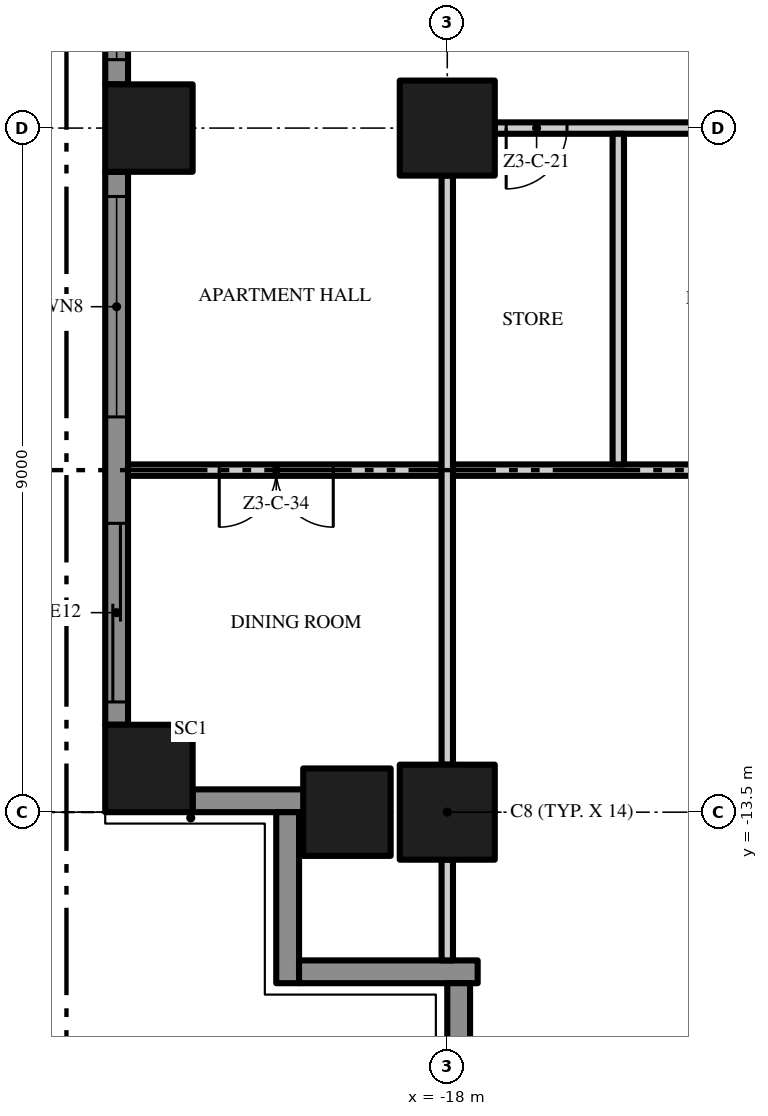
"""IFC4 building model, lengths in metres.
Left out: names, types, materials, properties, quantities, classifications, styles, units other than length and angle.
Written with IfcOpenShell. Run it as: python <this file> out.ifc"""

import sys

from ifc_helpers import new_model, si_unit, direction, frame, frame_2d, origin, origin_2d, place, context, subcontext, project, spatial, polyline, rectangle, outline, extrude, element, fill, save


model = new_model("IFC4")
c1 = context("Model", 3, precision=1e-05, world=origin(), true_north=direction((0.0, 1.0)))
c2 = subcontext(c1, "Body", "Model", "MODEL_VIEW")
j1 = project(units=[si_unit("LENGTHUNIT", "METRE"), si_unit("PLANEANGLEUNIT", "RADIAN")], contexts=[c1])
p1 = place(None, origin())
s1 = spatial("IfcSite", under=j1, at=p1, CompositionType="ELEMENT")
p2 = place(p1, origin())
s2 = spatial("IfcBuilding", under=s1, at=p2, CompositionType="ELEMENT")
p3 = place(p2, frame((0.0, 0.0, 155.4)))
s3 = spatial("IfcBuildingStorey", under=s2, at=p3, CompositionType="ELEMENT", Elevation=155.4)
for number, where, z_axis, x_axis in (
    (1, (-18.0, -13.5, 0.0), (0.0, 0.0, 1.0), (1.0, 0.0, 0.0)),
    (2, (-18.0, -4.5, 0.0), (0.0, 0.0, 1.0), (1.0, 0.0, 0.0)),
):
    element("IfcColumn", number, at=place(p3, frame(where, z_axis=z_axis, x_axis=x_axis)), inside=s3, PredefinedType="COLUMN", context=c2, shape_type="SweptSolid", body=[
        extrude(rectangle(XDim=1.25, YDim=1.25, at=origin_2d()), origin(), (0.0, 0.0, 1.0), 3.5),
    ])
for number, where, z_axis, x_axis in (
    (3, (-21.925, -12.925, 0.0), (0.0, 0.0, 1.0), (1.0, 0.0, 0.0)),
    (4, (-19.32, -13.5, 0.0), (0.0, 0.0, 1.0), (1.0, 0.0, 0.0)),
    (5, (-21.925, -4.5, 0.0), (0.0, 0.0, 1.0), (1.0, 0.0, 0.0)),
):
    element("IfcColumn", number, at=place(p3, frame(where, z_axis=z_axis, x_axis=x_axis)), inside=s3, PredefinedType="COLUMN", context=c2, shape_type="SweptSolid", body=[
        extrude(rectangle(XDim=1.15, YDim=1.15, at=origin_2d()), origin(), (0.0, 0.0, 1.0), 3.5),
    ])
p4 = place(p3, frame((-22.35, -3.925, 0.0), z_axis=(0.0, 0.0, 1.0), x_axis=(0.0, 1.0, 0.0)))
e6 = element("IfcWall", 6, at=p4, inside=s3, PredefinedType="SOLIDWALL", context=c2, shape_type="SweptSolid", body=[
    extrude(rectangle(XDim=7.85, YDim=0.3, at=frame_2d((3.925, 0.0))), origin(), (0.0, 0.0, 1.0), 3.5),
])
p5 = place(p4, frame((4.625, 0.0, 0.0)))
e7 = element("IfcOpeningElement", 7, at=p5, cuts=e6, PredefinedType="OPENING", context=c2, shape_type="SweptSolid", body=[
    extrude(rectangle(XDim=2.9, YDim=2.4, at=frame_2d((1.45, 1.2))), frame((0.0, 0.16, 0.0), z_axis=(0.0, -1.0, 0.0), x_axis=(1.0, 0.0, 0.0)), (0.0, 0.0, 1.0), 0.32),
])
p6 = place(p4, frame((0.325, 0.0, 0.45)))
e8 = element("IfcOpeningElement", 8, at=p6, cuts=e6, PredefinedType="OPENING", context=c2, shape_type="SweptSolid", body=[
    extrude(rectangle(XDim=2.9, YDim=2.65, at=frame_2d((1.45, 1.325))), frame((0.0, 0.16, 0.0), z_axis=(0.0, -1.0, 0.0), x_axis=(1.0, 0.0, 0.0)), (0.0, 0.0, 1.0), 0.32),
])
p7 = place(p3, frame((-22.35, -12.35, 0.0), z_axis=(0.0, 0.0, 1.0), x_axis=(0.0, 1.0, 0.0)))
e9 = element("IfcWall", 9, at=p7, inside=s3, PredefinedType="SOLIDWALL", context=c2, shape_type="SweptSolid", body=[
    extrude(rectangle(XDim=7.275, YDim=0.3, at=frame_2d((3.638, 0.0))), origin(), (0.0, 0.0, 1.0), 3.5),
])
p8 = place(p7, frame((4.05, 0.0, 0.45)))
e10 = element("IfcOpeningElement", 10, at=p8, cuts=e9, PredefinedType="OPENING", context=c2, shape_type="SweptSolid", body=[
    extrude(rectangle(XDim=2.9, YDim=2.65, at=frame_2d((1.45, 1.325))), frame((0.0, 0.16, 0.0), z_axis=(0.0, -1.0, 0.0), x_axis=(1.0, 0.0, 0.0)), (0.0, 0.0, 1.0), 0.32),
])
p9 = place(p7, frame((0.3, 0.0, 0.0)))
e11 = element("IfcOpeningElement", 11, at=p9, cuts=e9, PredefinedType="OPENING", context=c2, shape_type="SweptSolid", body=[
    extrude(rectangle(XDim=2.35, YDim=2.4, at=frame_2d((1.175, 1.2))), frame((0.0, 0.16, 0.0), z_axis=(0.0, -1.0, 0.0), x_axis=(1.0, 0.0, 0.0)), (0.0, 0.0, 1.0), 0.32),
])
p10 = place(p3, frame((-19.85, -13.35, 0.0), z_axis=(0.0, 0.0, 1.0), x_axis=(-1.0, 0.0, 0.0)))
e12 = element("IfcWall", 12, at=p10, inside=s3, PredefinedType="SOLIDWALL", context=c2, shape_type="SweptSolid", body=[
    extrude(rectangle(XDim=1.5, YDim=0.3, at=frame_2d((0.75, 0.0))), origin(), (0.0, 0.0, 1.0), 3.5),
])
p11 = place(p3, frame((-20.1, -15.75, 0.0), z_axis=(0.0, 0.0, 1.0), x_axis=(0.0, 1.0, 0.0)))
e13 = element("IfcWall", 13, at=p11, inside=s3, PredefinedType="SOLIDWALL", context=c2, shape_type="SweptSolid", body=[
    extrude(rectangle(XDim=2.25, YDim=0.3, at=frame_2d((1.125, 0.0))), origin(), (0.0, 0.0, 1.0), 3.5),
])
p12 = place(p3, frame((-17.6, -15.6, 0.0), z_axis=(0.0, 0.0, 1.0), x_axis=(-1.0, 0.0, 0.0)))
e14 = element("IfcWall", 14, at=p12, inside=s3, PredefinedType="SOLIDWALL", context=c2, shape_type="SweptSolid", body=[
    extrude(rectangle(XDim=2.35, YDim=0.3, at=frame_2d((1.175, 0.0))), origin(), (0.0, 0.0, 1.0), 3.5),
])
p13 = place(p3, frame((-17.85, -16.85, 0.0), z_axis=(0.0, 0.0, 1.0), x_axis=(0.0, 1.0, 0.0)))
e15 = element("IfcWall", 15, at=p13, inside=s3, PredefinedType="SOLIDWALL", context=c2, shape_type="SweptSolid", body=[
    extrude(rectangle(XDim=1.1, YDim=0.3, at=frame_2d((0.55, 0.0))), origin(), (0.0, 0.0, 1.0), 3.5),
])
p14 = place(p3, origin())
e16 = element("IfcWall", 16, at=p14, inside=s3, PredefinedType="USERDEFINED", context=c2, shape_type="SweptSolid", body=[
    extrude(outline(polyline([(-25.149, 18.0), (-24.488, 16.5), (-23.755, 15.0), (-23.231, 13.5), (-23.1, 12.375), (-23.115, 12.0), (-23.451, 10.5), (-24.112, 9.0), (-24.845, 7.5), (-25.369, 6.0), (-25.5, 4.875), (-25.485, 4.5), (-25.149, 3.0), (-24.488, 1.5), (-23.755, 0.0), (-23.231, -1.5), (-23.1, -2.625), (-23.115, -3.0), (-23.451, -4.5), (-24.112, -6.0), (-24.845, -7.5), (-25.369, -9.0), (-25.5, -10.125), (-25.485, -10.5), (-25.149, -12.0), (-24.488, -13.5), (-24.259, -13.399), (-24.91, -11.921), (-25.236, -10.467), (-25.249, -10.135), (-25.124, -9.056), (-24.614, -7.596), (-23.885, -6.105), (-23.213, -4.579), (-22.866, -3.033), (-22.849, -2.615), (-22.986, -1.444), (-23.524, 0.096), (-24.261, 1.605), (-24.91, 3.079), (-25.236, 4.533), (-25.249, 4.865), (-25.124, 5.944), (-24.614, 7.404), (-23.885, 8.895), (-23.213, 10.421), (-22.866, 11.967), (-22.849, 12.385), (-22.986, 13.556), (-23.524, 15.096), (-24.261, 16.605), (-24.92, 18.101), (-25.149, 18.0)])), origin(), (0.0, 0.0, 1.0), 0.9),
])
p15 = place(p3, frame((-18.075, -9.0, 0.0), z_axis=(0.0, 0.0, 1.0), x_axis=(-1.0, 0.0, 0.0)))
e17 = element("IfcWall", 17, at=p15, inside=s3, PredefinedType="PARTITIONING", context=c2, shape_type="SweptSolid", body=[
    extrude(rectangle(XDim=4.125, YDim=0.15, at=frame_2d((2.062, 0.0))), origin(), (0.0, 0.0, 1.0), 3.5),
])
p16 = place(p15, frame((1.425, 0.0, 0.0)))
e18 = element("IfcOpeningElement", 18, at=p16, cuts=e17, PredefinedType="OPENING", context=c2, shape_type="SweptSolid", body=[
    extrude(rectangle(XDim=1.5, YDim=2.4, at=frame_2d((0.75, 1.2))), frame((0.0, 0.085, 0.0), z_axis=(0.0, -1.0, 0.0), x_axis=(1.0, 0.0, 0.0)), (0.0, 0.0, 1.0), 0.17),
])
p17 = place(p3, frame((-6.825, -9.0, 0.0), z_axis=(0.0, 0.0, 1.0), x_axis=(-1.0, 0.0, 0.0)))
e19 = element("IfcWall", 19, at=p17, inside=s3, PredefinedType="PARTITIONING", context=c2, shape_type="SweptSolid", body=[
    extrude(rectangle(XDim=11.1, YDim=0.15, at=frame_2d((5.55, 0.0))), origin(), (0.0, 0.0, 1.0), 3.5),
])
p18 = place(p17, frame((0.575, 0.0, 0.0)))
e20 = element("IfcOpeningElement", 20, at=p18, cuts=e19, PredefinedType="OPENING", context=c2, shape_type="SweptSolid", body=[
    extrude(rectangle(XDim=1.0, YDim=2.4, at=frame_2d((0.5, 1.2))), frame((0.0, 0.085, 0.0), z_axis=(0.0, -1.0, 0.0), x_axis=(1.0, 0.0, 0.0)), (0.0, 0.0, 1.0), 0.17),
])
p19 = place(p17, frame((3.325, 0.0, 0.0)))
e21 = element("IfcOpeningElement", 21, at=p19, cuts=e19, PredefinedType="OPENING", context=c2, shape_type="SweptSolid", body=[
    extrude(rectangle(XDim=1.5, YDim=2.4, at=frame_2d((0.75, 1.2))), frame((0.0, 0.085, 0.0), z_axis=(0.0, -1.0, 0.0), x_axis=(1.0, 0.0, 0.0)), (0.0, 0.0, 1.0), 0.17),
])
p20 = place(p3, frame((-12.825, -4.5, 0.0), z_axis=(0.0, 0.0, 1.0), x_axis=(-1.0, 0.0, 0.0)))
e22 = element("IfcWall", 22, at=p20, inside=s3, PredefinedType="PARTITIONING", context=c2, shape_type="SweptSolid", body=[
    extrude(rectangle(XDim=4.55, YDim=0.15, at=frame_2d((2.275, 0.0))), origin(), (0.0, 0.0, 1.0), 3.5),
])
p21 = place(p20, frame((0.975, 0.0, 0.0)))
e23 = element("IfcOpeningElement", 23, at=p21, cuts=e22, PredefinedType="OPENING", context=c2, shape_type="SweptSolid", body=[
    extrude(rectangle(XDim=0.9, YDim=2.1, at=frame_2d((0.45, 1.05))), frame((0.0, 0.085, 0.0), z_axis=(0.0, -1.0, 0.0), x_axis=(1.0, 0.0, 0.0)), (0.0, 0.0, 1.0), 0.17),
])
p22 = place(p20, frame((3.6, 0.0, 0.0)))
e24 = element("IfcOpeningElement", 24, at=p22, cuts=e22, PredefinedType="OPENING", context=c2, shape_type="SweptSolid", body=[
    extrude(rectangle(XDim=0.8, YDim=2.0, at=frame_2d((0.4, 1.0))), frame((0.0, 0.085, 0.0), z_axis=(0.0, -1.0, 0.0), x_axis=(1.0, 0.0, 0.0)), (0.0, 0.0, 1.0), 0.17),
])
p23 = place(p3, frame((-18.0, -15.45, 0.0), z_axis=(0.0, 0.0, 1.0), x_axis=(0.0, 1.0, 0.0)))
e25 = element("IfcWall", 25, at=p23, inside=s3, PredefinedType="PARTITIONING", context=c2, shape_type="SweptSolid", body=[
    extrude(rectangle(XDim=1.325, YDim=0.15, at=frame_2d((0.662, 0.0))), origin(), (0.0, 0.0, 1.0), 3.5),
])
p24 = place(p3, frame((-18.0, -12.875, 0.0), z_axis=(0.0, 0.0, 1.0), x_axis=(0.0, 1.0, 0.0)))
e26 = element("IfcWall", 26, at=p24, inside=s3, PredefinedType="PARTITIONING", context=c2, shape_type="SweptSolid", body=[
    extrude(rectangle(XDim=7.75, YDim=0.15, at=frame_2d((3.875, 0.0))), origin(), (0.0, 0.0, 1.0), 3.5),
])
p25 = place(p3, frame((-15.75, -8.925, 0.0), z_axis=(0.0, 0.0, 1.0), x_axis=(0.0, 1.0, 0.0)))
e27 = element("IfcWall", 27, at=p25, inside=s3, PredefinedType="PARTITIONING", context=c2, shape_type="SweptSolid", body=[
    extrude(rectangle(XDim=4.35, YDim=0.15, at=frame_2d((2.175, 0.0))), origin(), (0.0, 0.0, 1.0), 3.5),
])
p26 = place(p6, origin())
e28 = element("IfcWindow", 28, at=p26, inside=s3, PartitioningType="SINGLE_PANEL", PredefinedType="WINDOW", context=c2, shape_type="SweptSolid", body=[
    extrude(rectangle(XDim=2.9, YDim=2.65, at=frame_2d((1.45, 1.325))), frame((0.0, 0.03, 0.0), z_axis=(0.0, -1.0, 0.0), x_axis=(1.0, 0.0, 0.0)), (0.0, 0.0, 1.0), 0.06),
])
fill(e8, e28)
p27 = place(p8, origin())
e29 = element("IfcWindow", 29, at=p27, inside=s3, PartitioningType="SINGLE_PANEL", PredefinedType="WINDOW", context=c2, shape_type="SweptSolid", body=[
    extrude(rectangle(XDim=2.9, YDim=2.65, at=frame_2d((1.45, 1.325))), frame((0.0, 0.03, 0.0), z_axis=(0.0, -1.0, 0.0), x_axis=(1.0, 0.0, 0.0)), (0.0, 0.0, 1.0), 0.06),
])
fill(e10, e29)
p28 = place(p9, origin())
e30 = element("IfcDoor", 30, at=p28, inside=s3, OperationType="SINGLE_SWING_LEFT", PredefinedType="DOOR", context=c2, shape_type="SweptSolid", body=[
    extrude(rectangle(XDim=2.35, YDim=2.4, at=frame_2d((1.175, 1.2))), frame((0.0, 0.025, 0.0), z_axis=(0.0, -1.0, 0.0), x_axis=(1.0, 0.0, 0.0)), (0.0, 0.0, 1.0), 0.05),
])
fill(e11, e30)
p29 = place(p22, origin())
e31 = element("IfcDoor", 31, at=p29, inside=s3, OperationType="SINGLE_SWING_RIGHT", PredefinedType="DOOR", context=c2, shape_type="SweptSolid", body=[
    extrude(rectangle(XDim=0.8, YDim=2.0, at=frame_2d((0.4, 1.0))), frame((0.0, 0.025, 0.0), z_axis=(0.0, -1.0, 0.0), x_axis=(1.0, 0.0, 0.0)), (0.0, 0.0, 1.0), 0.05),
])
fill(e24, e31)
p30 = place(p16, origin())
e32 = element("IfcDoor", 32, at=p30, inside=s3, OperationType="DOUBLE_DOOR_SINGLE_SWING", PredefinedType="DOOR", context=c2, shape_type="SweptSolid", body=[
    extrude(rectangle(XDim=1.5, YDim=2.4, at=frame_2d((0.75, 1.2))), frame((0.0, 0.025, 0.0), z_axis=(0.0, -1.0, 0.0), x_axis=(1.0, 0.0, 0.0)), (0.0, 0.0, 1.0), 0.05),
])
fill(e18, e32)
save(model, sys.argv[1])
